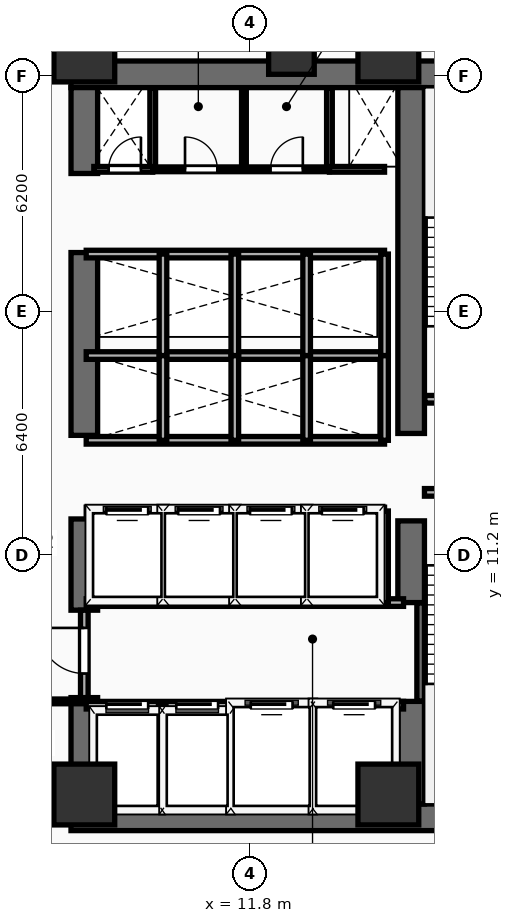
"""IFC4 building model, lengths in metres.
Left out: names, types, materials, properties, quantities, classifications, styles, units other than length and angle.
Written with IfcOpenShell. Run it as: python <this file> out.ifc"""

import sys

from ifc_helpers import new_model, si_unit, direction, frame, frame_2d, origin, origin_2d, place, context, subcontext, project, spatial, rectangle, extrude, element, fill, save


model = new_model("IFC4")
c1 = context("Model", 3, precision=1e-05, world=origin(), true_north=direction((0.0, 1.0)))
c2 = subcontext(c1, "Body", "Model", "MODEL_VIEW")
j1 = project(units=[si_unit("LENGTHUNIT", "METRE"), si_unit("PLANEANGLEUNIT", "RADIAN")], contexts=[c1])
p1 = place(None, origin())
s1 = spatial("IfcSite", under=j1, at=p1, CompositionType="ELEMENT")
p2 = place(p1, origin())
s2 = spatial("IfcBuilding", under=s1, at=p2, CompositionType="ELEMENT")
p3 = place(p2, frame((0.0, 0.0, 71.4)))
s3 = spatial("IfcBuildingStorey", under=s2, at=p3, CompositionType="ELEMENT", Elevation=71.4)
for number, where, z_axis, x_axis in (
    (1, (7.1, 4.3, 0.0), (0.0, 0.0, 1.0), (1.0, 0.0, 0.0)),
    (2, (7.1, 23.85, 0.0), (0.0, 0.0, 1.0), (1.0, 0.0, 0.0)),
):
    element("IfcWall", number, at=place(p3, frame(where, z_axis=z_axis, x_axis=x_axis)), inside=s3, PredefinedType="SHEAR", context=c2, shape_type="SweptSolid", body=[
        extrude(rectangle(XDim=14.05, YDim=0.7, at=frame_2d((7.025, 0.0))), origin(), (0.0, 0.0, 1.0), 3.54),
    ])
p4 = place(p3, frame((7.45, 4.65, 0.0), z_axis=(0.0, 0.0, 1.0), x_axis=(0.0, 1.0, 0.0)))
e3 = element("IfcWall", 3, at=p4, inside=s3, PredefinedType="SHEAR", context=c2, shape_type="SweptSolid", body=[
    extrude(rectangle(XDim=2.8, YDim=0.7, at=frame_2d((1.4, 0.0))), origin(), (0.0, 0.0, 1.0), 3.54),
])
p5 = place(p3, frame((7.45, 9.75, 0.0), z_axis=(0.0, 0.0, 1.0), x_axis=(0.0, 1.0, 0.0)))
e4 = element("IfcWall", 4, at=p5, inside=s3, PredefinedType="SHEAR", context=c2, shape_type="SweptSolid", body=[
    extrude(rectangle(XDim=2.4, YDim=0.7, at=frame_2d((1.2, 0.0))), origin(), (0.0, 0.0, 1.0), 3.54),
])
p6 = place(p3, frame((7.45, 14.35, 0.0), z_axis=(0.0, 0.0, 1.0), x_axis=(0.0, 1.0, 0.0)))
e5 = element("IfcWall", 5, at=p6, inside=s3, PredefinedType="SHEAR", context=c2, shape_type="SweptSolid", body=[
    extrude(rectangle(XDim=4.81, YDim=0.7, at=frame_2d((2.405, 0.0))), origin(), (0.0, 0.0, 1.0), 3.54),
])
p7 = place(p3, frame((7.45, 21.24, 0.0), z_axis=(0.0, 0.0, 1.0), x_axis=(0.0, 1.0, 0.0)))
e6 = element("IfcWall", 6, at=p7, inside=s3, PredefinedType="SHEAR", context=c2, shape_type="SweptSolid", body=[
    extrude(rectangle(XDim=2.26, YDim=0.7, at=frame_2d((1.13, 0.0))), origin(), (0.0, 0.0, 1.0), 3.54),
])
p8 = place(p3, frame((16.05, 4.65, 0.0), z_axis=(0.0, 0.0, 1.0), x_axis=(0.0, 1.0, 0.0)))
e7 = element("IfcWall", 7, at=p8, inside=s3, PredefinedType="SHEAR", context=c2, shape_type="SweptSolid", body=[
    extrude(rectangle(XDim=2.7, YDim=0.7, at=frame_2d((1.35, 0.0))), origin(), (0.0, 0.0, 1.0), 3.54),
])
p9 = place(p3, frame((16.05, 9.95, 0.0), z_axis=(0.0, 0.0, 1.0), x_axis=(0.0, 1.0, 0.0)))
e8 = element("IfcWall", 8, at=p9, inside=s3, PredefinedType="SHEAR", context=c2, shape_type="SweptSolid", body=[
    extrude(rectangle(XDim=2.15, YDim=0.7, at=frame_2d((1.075, 0.0))), origin(), (0.0, 0.0, 1.0), 3.54),
])
p10 = place(p3, frame((16.05, 14.4, 0.0), z_axis=(0.0, 0.0, 1.0), x_axis=(0.0, 1.0, 0.0)))
e9 = element("IfcWall", 9, at=p10, inside=s3, PredefinedType="SHEAR", context=c2, shape_type="SweptSolid", body=[
    extrude(rectangle(XDim=9.1, YDim=0.7, at=frame_2d((4.55, 0.0))), origin(), (0.0, 0.0, 1.0), 3.54),
])
for number, where, z_axis, x_axis in (
    (10, (7.45, 4.9, 0.0), (0.0, 0.0, 1.0), (1.0, 0.0, 0.0)),
    (11, (15.45, 4.9, 0.0), (0.0, 0.0, 1.0), (1.0, 0.0, 0.0)),
    (12, (7.45, 24.45, 0.0), (0.0, 0.0, 1.0), (1.0, 0.0, 0.0)),
    (13, (15.45, 24.45, 0.0), (0.0, 0.0, 1.0), (1.0, 0.0, 0.0)),
):
    element("IfcColumn", number, at=place(p3, frame(where, z_axis=z_axis, x_axis=x_axis)), inside=s3, PredefinedType="COLUMN", context=c2, shape_type="SweptSolid", body=[
        extrude(rectangle(XDim=1.6, YDim=1.6, at=origin_2d()), origin(), (0.0, 0.0, 1.0), 3.54),
    ])
p11 = place(p3, frame((12.9, 24.45, 0.0), z_axis=(0.0, 0.0, 1.0), x_axis=(1.0, 0.0, 0.0)))
e14 = element("IfcColumn", 14, at=p11, inside=s3, PredefinedType="COLUMN", context=c2, shape_type="SweptSolid", body=[
    extrude(rectangle(XDim=1.2, YDim=1.2, at=origin_2d()), origin(), (0.0, 0.0, 1.0), 3.54),
])
p12 = place(p3, frame((16.3, 7.36, 0.0), z_axis=(0.0, 0.0, 1.0), x_axis=(0.0, 1.0, 0.0)))
e15 = element("IfcWall", 15, at=p12, inside=s3, PredefinedType="SHEAR", context=c2, shape_type="SweptSolid", body=[
    extrude(rectangle(XDim=2.58, YDim=0.2, at=frame_2d((1.29, 0.0))), origin(), (0.0, 0.0, 1.0), 3.54),
])
p13 = place(p3, frame((16.4, 12.85, 0.0), z_axis=(0.0, 0.0, 1.0), x_axis=(1.0, 0.0, 0.0)))
e16 = element("IfcWall", 16, at=p13, inside=s3, PredefinedType="PARTITIONING", context=c2, shape_type="SweptSolid", body=[
    extrude(rectangle(XDim=3.96, YDim=0.2, at=frame_2d((1.98, 0.0))), origin(), (0.0, 0.0, 1.0), 3.54),
])
p14 = place(p13, frame((1.304, 0.0, 0.0)))
e17 = element("IfcOpeningElement", 17, at=p14, cuts=e16, PredefinedType="OPENING", context=c2, shape_type="SweptSolid", body=[
    extrude(rectangle(XDim=1.1, YDim=2.2, at=frame_2d((0.55, 1.1))), frame((0.0, 0.11, 0.0), z_axis=(0.0, -1.0, 0.0), x_axis=(1.0, 0.0, 0.0)), (0.0, 0.0, 1.0), 0.22),
])
p15 = place(p3, frame((16.41, 15.3, 0.0), z_axis=(0.0, 0.0, 1.0), x_axis=(1.0, 0.0, 0.0)))
e18 = element("IfcWall", 18, at=p15, inside=s3, PredefinedType="PARTITIONING", context=c2, shape_type="SweptSolid", body=[
    extrude(rectangle(XDim=3.95, YDim=0.2, at=frame_2d((1.975, 0.0))), origin(), (0.0, 0.0, 1.0), 3.54),
])
p16 = place(p15, frame((1.294, 0.0, 0.0)))
e19 = element("IfcOpeningElement", 19, at=p16, cuts=e18, PredefinedType="OPENING", context=c2, shape_type="SweptSolid", body=[
    extrude(rectangle(XDim=1.1, YDim=2.2, at=frame_2d((0.55, 1.1))), frame((0.0, 0.11, 0.0), z_axis=(0.0, -1.0, 0.0), x_axis=(1.0, 0.0, 0.0)), (0.0, 0.0, 1.0), 0.22),
])
p17 = place(p3, frame((7.5, 7.25, 0.0), z_axis=(0.0, 0.0, 1.0), x_axis=(1.0, 0.0, 0.0)))
e20 = element("IfcWall", 20, at=p17, inside=s3, PredefinedType="PARTITIONING", context=c2, shape_type="SweptSolid", body=[
    extrude(rectangle(XDim=8.35, YDim=0.2, at=frame_2d((4.175, 0.0))), origin(), (0.0, 0.0, 1.0), 3.54),
])
p18 = place(p17, frame((0.53, 0.0, 0.0)))
e21 = element("IfcOpeningElement", 21, at=p18, cuts=e20, PredefinedType="OPENING", context=c2, shape_type="SweptSolid", body=[
    extrude(rectangle(XDim=1.1, YDim=2.2, at=frame_2d((0.55, 1.1))), frame((0.0, 0.11, 0.0), z_axis=(0.0, -1.0, 0.0), x_axis=(1.0, 0.0, 0.0)), (0.0, 0.0, 1.0), 0.22),
])
p19 = place(p17, frame((2.37, 0.0, 0.0)))
e22 = element("IfcOpeningElement", 22, at=p19, cuts=e20, PredefinedType="OPENING", context=c2, shape_type="SweptSolid", body=[
    extrude(rectangle(XDim=1.1, YDim=2.2, at=frame_2d((0.55, 1.1))), frame((0.0, 0.11, 0.0), z_axis=(0.0, -1.0, 0.0), x_axis=(1.0, 0.0, 0.0)), (0.0, 0.0, 1.0), 0.22),
])
p20 = place(p17, frame((4.33, 0.0, 0.0)))
e23 = element("IfcOpeningElement", 23, at=p20, cuts=e20, PredefinedType="OPENING", context=c2, shape_type="SweptSolid", body=[
    extrude(rectangle(XDim=1.1, YDim=2.2, at=frame_2d((0.55, 1.1))), frame((0.0, 0.11, 0.0), z_axis=(0.0, -1.0, 0.0), x_axis=(1.0, 0.0, 0.0)), (0.0, 0.0, 1.0), 0.22),
])
p21 = place(p17, frame((6.5, 0.0, 0.0)))
e24 = element("IfcOpeningElement", 24, at=p21, cuts=e20, PredefinedType="OPENING", context=c2, shape_type="SweptSolid", body=[
    extrude(rectangle(XDim=1.1, YDim=2.2, at=frame_2d((0.55, 1.1))), frame((0.0, 0.11, 0.0), z_axis=(0.0, -1.0, 0.0), x_axis=(1.0, 0.0, 0.0)), (0.0, 0.0, 1.0), 0.22),
])
p22 = place(p3, frame((7.5, 9.95, 0.0), z_axis=(0.0, 0.0, 1.0), x_axis=(1.0, 0.0, 0.0)))
e25 = element("IfcWall", 25, at=p22, inside=s3, PredefinedType="PARTITIONING", context=c2, shape_type="SweptSolid", body=[
    extrude(rectangle(XDim=8.35, YDim=0.2, at=frame_2d((4.175, 0.0))), origin(), (0.0, 0.0, 1.0), 3.54),
])
for number, where, z_axis, x_axis in (
    (26, (9.5, 4.45, 0.0), (0.0, 0.0, 1.0), (0.0, 1.0, 0.0)),
    (27, (11.36, 4.45, 0.0), (0.0, 0.0, 1.0), (0.0, 1.0, 0.0)),
    (28, (13.46, 4.45, 0.0), (0.0, 0.0, 1.0), (0.0, 1.0, 0.0)),
):
    element("IfcWall", number, at=place(p3, frame(where, z_axis=z_axis, x_axis=x_axis)), inside=s3, PredefinedType="PARTITIONING", context=c2, shape_type="SweptSolid", body=[
        extrude(rectangle(XDim=2.8, YDim=0.2, at=frame_2d((1.4, 0.0))), origin(), (0.0, 0.0, 1.0), 3.54),
    ])
p23 = place(p3, frame((7.45, 7.45, 0.0), z_axis=(0.0, 0.0, 1.0), x_axis=(0.0, 1.0, 0.0)))
e29 = element("IfcWall", 29, at=p23, inside=s3, PredefinedType="PARTITIONING", context=c2, shape_type="SweptSolid", body=[
    extrude(rectangle(XDim=2.3, YDim=0.2, at=frame_2d((1.15, 0.0))), origin(), (0.0, 0.0, 1.0), 2.52),
])
p24 = place(p23, frame((0.633, 0.0, 0.0)))
e30 = element("IfcOpeningElement", 30, at=p24, cuts=e29, PredefinedType="OPENING", context=c2, shape_type="SweptSolid", body=[
    extrude(rectangle(XDim=1.2, YDim=2.25, at=frame_2d((0.6, 1.125))), frame((0.0, 0.11, 0.0), z_axis=(0.0, -1.0, 0.0), x_axis=(1.0, 0.0, 0.0)), (0.0, 0.0, 1.0), 0.22),
])
p25 = place(p3, frame((7.5, 12.36, 0.0), z_axis=(0.0, 0.0, 1.0), x_axis=(1.0, 0.0, 0.0)))
e31 = element("IfcWall", 31, at=p25, inside=s3, PredefinedType="PARTITIONING", context=c2, shape_type="SweptSolid", body=[
    extrude(rectangle(XDim=7.85, YDim=0.2, at=frame_2d((3.925, 0.0))), origin(), (0.0, 0.0, 1.0), 3.54),
])
p26 = place(p25, frame((0.53, 0.0, 0.0)))
e32 = element("IfcOpeningElement", 32, at=p26, cuts=e31, PredefinedType="OPENING", context=c2, shape_type="SweptSolid", body=[
    extrude(rectangle(XDim=1.1, YDim=2.2, at=frame_2d((0.55, 1.1))), frame((0.0, 0.11, 0.0), z_axis=(0.0, -1.0, 0.0), x_axis=(1.0, 0.0, 0.0)), (0.0, 0.0, 1.0), 0.22),
])
p27 = place(p25, frame((2.42, 0.0, 0.0)))
e33 = element("IfcOpeningElement", 33, at=p27, cuts=e31, PredefinedType="OPENING", context=c2, shape_type="SweptSolid", body=[
    extrude(rectangle(XDim=1.1, YDim=2.2, at=frame_2d((0.55, 1.1))), frame((0.0, 0.11, 0.0), z_axis=(0.0, -1.0, 0.0), x_axis=(1.0, 0.0, 0.0)), (0.0, 0.0, 1.0), 0.22),
])
p28 = place(p25, frame((4.31, 0.0, 0.0)))
e34 = element("IfcOpeningElement", 34, at=p28, cuts=e31, PredefinedType="OPENING", context=c2, shape_type="SweptSolid", body=[
    extrude(rectangle(XDim=1.1, YDim=2.2, at=frame_2d((0.55, 1.1))), frame((0.0, 0.11, 0.0), z_axis=(0.0, -1.0, 0.0), x_axis=(1.0, 0.0, 0.0)), (0.0, 0.0, 1.0), 0.22),
])
p29 = place(p25, frame((6.2, 0.0, 0.0)))
e35 = element("IfcOpeningElement", 35, at=p29, cuts=e31, PredefinedType="OPENING", context=c2, shape_type="SweptSolid", body=[
    extrude(rectangle(XDim=1.1, YDim=2.2, at=frame_2d((0.55, 1.1))), frame((0.0, 0.11, 0.0), z_axis=(0.0, -1.0, 0.0), x_axis=(1.0, 0.0, 0.0)), (0.0, 0.0, 1.0), 0.22),
])
for number, where, z_axis, x_axis in (
    (36, (15.35, 9.95, 0.0), (0.0, 0.0, 1.0), (0.0, 1.0, 0.0)),
    (37, (9.52, 9.95, 0.0), (0.0, 0.0, 1.0), (0.0, 1.0, 0.0)),
    (38, (11.41, 9.95, 0.0), (0.0, 0.0, 1.0), (0.0, 1.0, 0.0)),
    (39, (13.3, 9.95, 0.0), (0.0, 0.0, 1.0), (0.0, 1.0, 0.0)),
):
    element("IfcWall", number, at=place(p3, frame(where, z_axis=z_axis, x_axis=x_axis)), inside=s3, PredefinedType="PARTITIONING", context=c2, shape_type="SweptSolid", body=[
        extrude(rectangle(XDim=2.41, YDim=0.2, at=frame_2d((1.205, 0.0))), origin(), (0.0, 0.0, 1.0), 3.54),
    ])
for number, where, z_axis, x_axis in (
    (40, (7.5, 14.22, 0.0), (0.0, 0.0, 1.0), (1.0, 0.0, 0.0)),
    (41, (7.5, 16.45, 0.0), (0.0, 0.0, 1.0), (1.0, 0.0, 0.0)),
):
    element("IfcWall", number, at=place(p3, frame(where, z_axis=z_axis, x_axis=x_axis)), inside=s3, PredefinedType="PARTITIONING", context=c2, shape_type="SweptSolid", body=[
        extrude(rectangle(XDim=7.85, YDim=0.2, at=frame_2d((3.925, 0.0))), origin(), (0.0, 0.0, 1.0), 3.54),
    ])
for number, where, z_axis, x_axis in (
    (42, (15.35, 14.22, 0.0), (0.0, 0.0, 1.0), (0.0, 1.0, 0.0)),
    (43, (9.52, 14.22, 0.0), (0.0, 0.0, 1.0), (0.0, 1.0, 0.0)),
    (44, (11.41, 14.22, 0.0), (0.0, 0.0, 1.0), (0.0, 1.0, 0.0)),
    (45, (13.3, 14.22, 0.0), (0.0, 0.0, 1.0), (0.0, 1.0, 0.0)),
):
    element("IfcWall", number, at=place(p3, frame(where, z_axis=z_axis, x_axis=x_axis)), inside=s3, PredefinedType="PARTITIONING", context=c2, shape_type="SweptSolid", body=[
        extrude(rectangle(XDim=2.23, YDim=0.2, at=frame_2d((1.115, 0.0))), origin(), (0.0, 0.0, 1.0), 3.54),
    ])
p30 = place(p3, frame((7.5, 19.12, 0.0), z_axis=(0.0, 0.0, 1.0), x_axis=(1.0, 0.0, 0.0)))
e46 = element("IfcWall", 46, at=p30, inside=s3, PredefinedType="PARTITIONING", context=c2, shape_type="SweptSolid", body=[
    extrude(rectangle(XDim=7.85, YDim=0.2, at=frame_2d((3.925, 0.0))), origin(), (0.0, 0.0, 1.0), 3.54),
])
for number, where, z_axis, x_axis in (
    (47, (15.35, 16.45, 0.0), (0.0, 0.0, 1.0), (0.0, 1.0, 0.0)),
    (48, (9.52, 16.45, 0.0), (0.0, 0.0, 1.0), (0.0, 1.0, 0.0)),
    (49, (11.41, 16.45, 0.0), (0.0, 0.0, 1.0), (0.0, 1.0, 0.0)),
    (50, (13.3, 16.45, 0.0), (0.0, 0.0, 1.0), (0.0, 1.0, 0.0)),
):
    element("IfcWall", number, at=place(p3, frame(where, z_axis=z_axis, x_axis=x_axis)), inside=s3, PredefinedType="PARTITIONING", context=c2, shape_type="SweptSolid", body=[
        extrude(rectangle(XDim=2.67, YDim=0.2, at=frame_2d((1.335, 0.0))), origin(), (0.0, 0.0, 1.0), 3.54),
    ])
for number, where, z_axis, x_axis in (
    (51, (9.25, 21.35, 0.0), (0.0, 0.0, 1.0), (0.0, 1.0, 0.0)),
    (52, (13.9, 21.35, 0.0), (0.0, 0.0, 1.0), (0.0, 1.0, 0.0)),
):
    element("IfcWall", number, at=place(p3, frame(where, z_axis=z_axis, x_axis=x_axis)), inside=s3, PredefinedType="PARTITIONING", context=c2, shape_type="SweptSolid", body=[
        extrude(rectangle(XDim=2.13, YDim=0.15, at=frame_2d((1.065, 0.0))), origin(), (0.0, 0.0, 1.0), 3.54),
    ])
p31 = place(p3, frame((7.7, 21.35, 0.0), z_axis=(0.0, 0.0, 1.0), x_axis=(1.0, 0.0, 0.0)))
e53 = element("IfcWall", 53, at=p31, inside=s3, PredefinedType="PARTITIONING", context=c2, shape_type="SweptSolid", body=[
    extrude(rectangle(XDim=1.55, YDim=0.15, at=frame_2d((0.775, 0.0))), origin(), (0.0, 0.0, 1.0), 3.54),
])
p32 = place(p31, frame((0.39, 0.0, 0.0)))
e54 = element("IfcOpeningElement", 54, at=p32, cuts=e53, PredefinedType="OPENING", context=c2, shape_type="SweptSolid", body=[
    extrude(rectangle(XDim=0.85, YDim=2.15, at=frame_2d((0.425, 1.075))), frame((0.0, 0.085, 0.0), z_axis=(0.0, -1.0, 0.0), x_axis=(1.0, 0.0, 0.0)), (0.0, 0.0, 1.0), 0.17),
])
p33 = place(p3, frame((13.9, 21.35, 0.0), z_axis=(0.0, 0.0, 1.0), x_axis=(1.0, 0.0, 0.0)))
e55 = element("IfcWall", 55, at=p33, inside=s3, PredefinedType="PARTITIONING", context=c2, shape_type="SweptSolid", body=[
    extrude(rectangle(XDim=1.45, YDim=0.15, at=frame_2d((0.725, 0.0))), origin(), (0.0, 0.0, 1.0), 3.54),
])
p34 = place(p3, frame((9.25, 21.35, 0.0), z_axis=(0.0, 0.0, 1.0), x_axis=(1.0, 0.0, 0.0)))
e56 = element("IfcWall", 56, at=p34, inside=s3, PredefinedType="PARTITIONING", context=c2, shape_type="SweptSolid", body=[
    extrude(rectangle(XDim=4.65, YDim=0.125, at=frame_2d((2.325, 0.0))), origin(), (0.0, 0.0, 1.0), 3.54),
])
p35 = place(p34, frame((0.85, 0.0, 0.0)))
e57 = element("IfcOpeningElement", 57, at=p35, cuts=e56, PredefinedType="OPENING", context=c2, shape_type="SweptSolid", body=[
    extrude(rectangle(XDim=0.85, YDim=2.15, at=frame_2d((0.425, 1.075))), frame((0.0, 0.073, 0.0), z_axis=(0.0, -1.0, 0.0), x_axis=(1.0, 0.0, 0.0)), (0.0, 0.0, 1.0), 0.145),
])
p36 = place(p34, frame((3.1, 0.0, 0.0)))
e58 = element("IfcOpeningElement", 58, at=p36, cuts=e56, PredefinedType="OPENING", context=c2, shape_type="SweptSolid", body=[
    extrude(rectangle(XDim=0.85, YDim=2.15, at=frame_2d((0.425, 1.075))), frame((0.0, 0.073, 0.0), z_axis=(0.0, -1.0, 0.0), x_axis=(1.0, 0.0, 0.0)), (0.0, 0.0, 1.0), 0.145),
])
p37 = place(p3, frame((11.65, 21.35, 0.0), z_axis=(0.0, 0.0, 1.0), x_axis=(0.0, 1.0, 0.0)))
e59 = element("IfcWall", 59, at=p37, inside=s3, PredefinedType="PARTITIONING", context=c2, shape_type="SweptSolid", body=[
    extrude(rectangle(XDim=2.13, YDim=0.125, at=frame_2d((1.065, 0.0))), origin(), (0.0, 0.0, 1.0), 3.54),
])
p38 = place(p3, frame((1.64, 7.35, 0.0), z_axis=(0.0, 0.0, 1.0), x_axis=(1.0, 0.0, 0.0)))
e60 = element("IfcWall", 60, at=p38, inside=s3, PredefinedType="PARTITIONING", context=c2, shape_type="SweptSolid", body=[
    extrude(rectangle(XDim=5.76, YDim=0.125, at=frame_2d((2.88, 0.0))), origin(), (0.0, 0.0, 1.0), 3.54),
])
p39 = place(p38, frame((4.087, 0.0, 0.0)))
e61 = element("IfcOpeningElement", 61, at=p39, cuts=e60, PredefinedType="OPENING", context=c2, shape_type="SweptSolid", body=[
    extrude(rectangle(XDim=0.85, YDim=2.15, at=frame_2d((0.425, 1.075))), frame((0.0, 0.073, 0.0), z_axis=(0.0, -1.0, 0.0), x_axis=(1.0, 0.0, 0.0)), (0.0, 0.0, 1.0), 0.145),
])
p40 = place(p18, origin())
e62 = element("IfcDoor", 62, at=p40, inside=s3, OperationType="SLIDING_TO_LEFT", PredefinedType="DOOR", context=c2, shape_type="SweptSolid", body=[
    extrude(rectangle(XDim=1.1, YDim=2.2, at=frame_2d((0.55, 1.1))), frame((0.0, 0.025, 0.0), z_axis=(0.0, -1.0, 0.0), x_axis=(1.0, 0.0, 0.0)), (0.0, 0.0, 1.0), 0.05),
])
fill(e21, e62)
p41 = place(p19, origin())
e63 = element("IfcDoor", 63, at=p41, inside=s3, OperationType="SLIDING_TO_LEFT", PredefinedType="DOOR", context=c2, shape_type="SweptSolid", body=[
    extrude(rectangle(XDim=1.1, YDim=2.2, at=frame_2d((0.55, 1.1))), frame((0.0, 0.025, 0.0), z_axis=(0.0, -1.0, 0.0), x_axis=(1.0, 0.0, 0.0)), (0.0, 0.0, 1.0), 0.05),
])
fill(e22, e63)
p42 = place(p20, origin())
e64 = element("IfcDoor", 64, at=p42, inside=s3, OperationType="SLIDING_TO_LEFT", PredefinedType="DOOR", context=c2, shape_type="SweptSolid", body=[
    extrude(rectangle(XDim=1.1, YDim=2.2, at=frame_2d((0.55, 1.1))), frame((0.0, 0.025, 0.0), z_axis=(0.0, -1.0, 0.0), x_axis=(1.0, 0.0, 0.0)), (0.0, 0.0, 1.0), 0.05),
])
fill(e23, e64)
p43 = place(p21, origin())
e65 = element("IfcDoor", 65, at=p43, inside=s3, OperationType="SLIDING_TO_LEFT", PredefinedType="DOOR", context=c2, shape_type="SweptSolid", body=[
    extrude(rectangle(XDim=1.1, YDim=2.2, at=frame_2d((0.55, 1.1))), frame((0.0, 0.025, 0.0), z_axis=(0.0, -1.0, 0.0), x_axis=(1.0, 0.0, 0.0)), (0.0, 0.0, 1.0), 0.05),
])
fill(e24, e65)
p44 = place(p24, frame((1.2, 0.0, 0.0), z_axis=(0.0, 0.0, 1.0), x_axis=(-1.0, 0.0, 0.0)))
e66 = element("IfcDoor", 66, at=p44, inside=s3, OperationType="SINGLE_SWING_LEFT", PredefinedType="DOOR", context=c2, shape_type="SweptSolid", body=[
    extrude(rectangle(XDim=1.2, YDim=2.25, at=frame_2d((0.6, 1.125))), frame((0.0, 0.025, 0.0), z_axis=(0.0, -1.0, 0.0), x_axis=(1.0, 0.0, 0.0)), (0.0, 0.0, 1.0), 0.05),
])
fill(e30, e66)
p45 = place(p26, origin())
e67 = element("IfcDoor", 67, at=p45, inside=s3, OperationType="SLIDING_TO_LEFT", PredefinedType="DOOR", context=c2, shape_type="SweptSolid", body=[
    extrude(rectangle(XDim=1.1, YDim=2.2, at=frame_2d((0.55, 1.1))), frame((0.0, 0.025, 0.0), z_axis=(0.0, -1.0, 0.0), x_axis=(1.0, 0.0, 0.0)), (0.0, 0.0, 1.0), 0.05),
])
fill(e32, e67)
p46 = place(p27, origin())
e68 = element("IfcDoor", 68, at=p46, inside=s3, OperationType="SLIDING_TO_LEFT", PredefinedType="DOOR", context=c2, shape_type="SweptSolid", body=[
    extrude(rectangle(XDim=1.1, YDim=2.2, at=frame_2d((0.55, 1.1))), frame((0.0, 0.025, 0.0), z_axis=(0.0, -1.0, 0.0), x_axis=(1.0, 0.0, 0.0)), (0.0, 0.0, 1.0), 0.05),
])
fill(e33, e68)
p47 = place(p28, origin())
e69 = element("IfcDoor", 69, at=p47, inside=s3, OperationType="SLIDING_TO_LEFT", PredefinedType="DOOR", context=c2, shape_type="SweptSolid", body=[
    extrude(rectangle(XDim=1.1, YDim=2.2, at=frame_2d((0.55, 1.1))), frame((0.0, 0.025, 0.0), z_axis=(0.0, -1.0, 0.0), x_axis=(1.0, 0.0, 0.0)), (0.0, 0.0, 1.0), 0.05),
])
fill(e34, e69)
p48 = place(p29, origin())
e70 = element("IfcDoor", 70, at=p48, inside=s3, OperationType="SLIDING_TO_LEFT", PredefinedType="DOOR", context=c2, shape_type="SweptSolid", body=[
    extrude(rectangle(XDim=1.1, YDim=2.2, at=frame_2d((0.55, 1.1))), frame((0.0, 0.025, 0.0), z_axis=(0.0, -1.0, 0.0), x_axis=(1.0, 0.0, 0.0)), (0.0, 0.0, 1.0), 0.05),
])
fill(e35, e70)
p49 = place(p32, origin())
e71 = element("IfcDoor", 71, at=p49, inside=s3, OperationType="SINGLE_SWING_RIGHT", PredefinedType="DOOR", context=c2, shape_type="SweptSolid", body=[
    extrude(rectangle(XDim=0.85, YDim=2.15, at=frame_2d((0.425, 1.075))), frame((0.0, 0.025, 0.0), z_axis=(0.0, -1.0, 0.0), x_axis=(1.0, 0.0, 0.0)), (0.0, 0.0, 1.0), 0.05),
])
fill(e54, e71)
p50 = place(p35, origin())
e72 = element("IfcDoor", 72, at=p50, inside=s3, OperationType="SINGLE_SWING_LEFT", PredefinedType="DOOR", context=c2, shape_type="SweptSolid", body=[
    extrude(rectangle(XDim=0.85, YDim=2.15, at=frame_2d((0.425, 1.075))), frame((0.0, 0.025, 0.0), z_axis=(0.0, -1.0, 0.0), x_axis=(1.0, 0.0, 0.0)), (0.0, 0.0, 1.0), 0.05),
])
fill(e57, e72)
p51 = place(p36, origin())
e73 = element("IfcDoor", 73, at=p51, inside=s3, OperationType="SINGLE_SWING_RIGHT", PredefinedType="DOOR", context=c2, shape_type="SweptSolid", body=[
    extrude(rectangle(XDim=0.85, YDim=2.15, at=frame_2d((0.425, 1.075))), frame((0.0, 0.025, 0.0), z_axis=(0.0, -1.0, 0.0), x_axis=(1.0, 0.0, 0.0)), (0.0, 0.0, 1.0), 0.05),
])
fill(e58, e73)
save(model, sys.argv[1])
